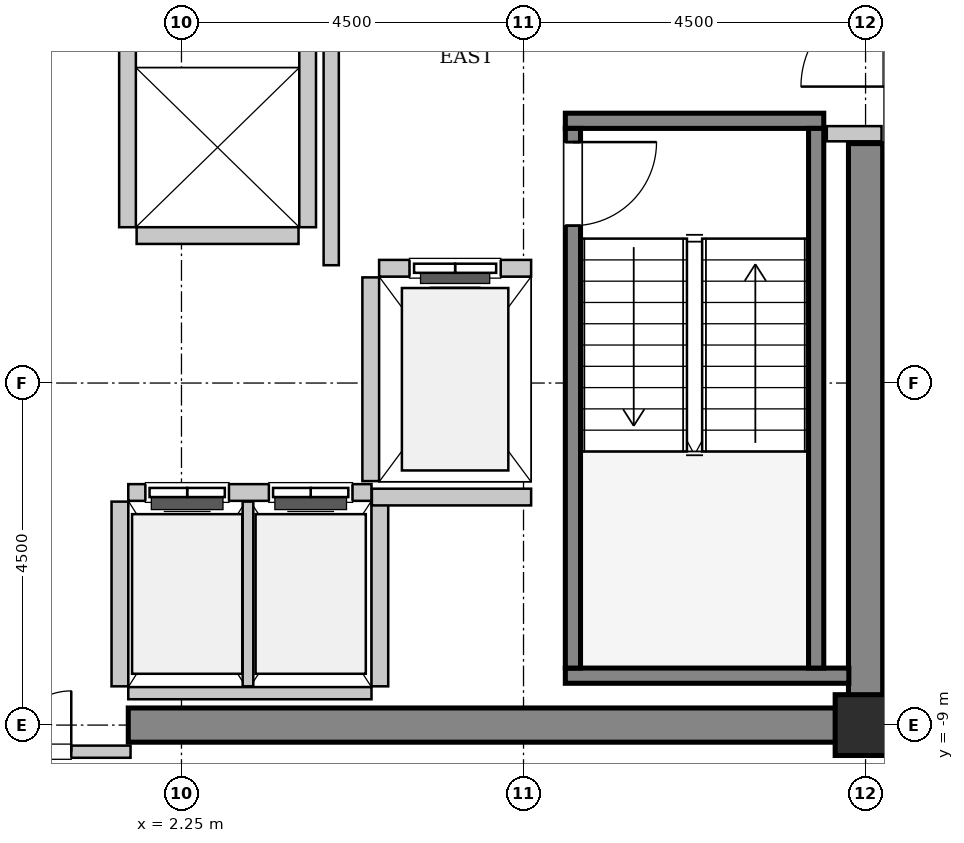
"""IFC4 building model, lengths in metres.
Left out: names, types, materials, properties, quantities, classifications, styles, units other than length and angle.
Written with IfcOpenShell. Run it as: python <this file> out.ifc"""

import sys

from ifc_helpers import new_model, si_unit, direction, frame, frame_2d, origin, origin_2d, place, context, subcontext, project, spatial, rectangle, hollow_rectangle, extrude, source, transform, mapped, element, fill, save


model = new_model("IFC4")
c1 = context("Model", 3, precision=1e-05, world=origin(), true_north=direction((0.0, 1.0)))
c2 = subcontext(c1, "Body", "Model", "MODEL_VIEW")
j1 = project(units=[si_unit("LENGTHUNIT", "METRE"), si_unit("PLANEANGLEUNIT", "RADIAN")], contexts=[c1])
p1 = place(None, origin())
s1 = spatial("IfcSite", under=j1, at=p1, CompositionType="ELEMENT")
p2 = place(p1, origin())
s2 = spatial("IfcBuilding", under=s1, at=p2, CompositionType="ELEMENT")
p3 = place(p2, frame((0.0, 0.0, 218.0)))
s3 = spatial("IfcBuildingStorey", under=s2, at=p3, CompositionType="ELEMENT", Elevation=218.0)
m1 = source(origin(), c2, "Body", "SweptSolid", [
    extrude(rectangle(XDim=9.925, YDim=0.45, at=frame_2d((4.962, 0.0))), origin(), (0.0, 0.0, 1.0), 3.8),
])
p4 = place(p3, frame((1.55, -9.0, 0.0), z_axis=(0.0, 0.0, 1.0), x_axis=(1.0, 0.0, 0.0)))
e1 = element("IfcWall", 1, at=p4, inside=s3, PredefinedType="SHEAR", context=c2, shape_type="MappedRepresentation", body=[
    mapped(m1, transform((0.0, 0.0, 0.0), x_axis=(1.0, 0.0, 0.0), y_axis=(0.0, 1.0, 0.0), z_axis=(0.0, 0.0, 1.0), scale=1.0)),
])
m2 = source(origin(), c2, "Body", "SweptSolid", [
    extrude(rectangle(XDim=7.425, YDim=0.45, at=frame_2d((3.712, 0.0))), origin(), (0.0, 0.0, 1.0), 3.8),
])
p5 = place(p3, frame((11.25, -8.775, 0.0), z_axis=(0.0, 0.0, 1.0), x_axis=(0.0, 1.0, 0.0)))
e2 = element("IfcWall", 2, at=p5, inside=s3, PredefinedType="SHEAR", context=c2, shape_type="MappedRepresentation", body=[
    mapped(m2, transform((0.0, 0.0, 0.0), x_axis=(1.0, 0.0, 0.0), y_axis=(0.0, 1.0, 0.0), z_axis=(0.0, 0.0, 1.0), scale=1.0)),
])
m3 = source(origin(), c2, "Body", "SweptSolid", [
    extrude(hollow_rectangle(XDim=0.8, YDim=0.8, WallThickness=0.04, InnerFilletRadius=0.04, OuterFilletRadius=0.08, at=origin_2d()), origin(), (0.0, 0.0, 1.0), 3.8),
])
p6 = place(p3, frame((11.25, -9.0, 0.0), z_axis=(0.0, 0.0, 1.0), x_axis=(1.0, 0.0, 0.0)))
e3 = element("IfcColumn", 3, at=p6, inside=s3, PredefinedType="COLUMN", context=c2, shape_type="MappedRepresentation", body=[
    mapped(m3, transform((0.0, 0.0, 0.0), x_axis=(1.0, 0.0, 0.0), y_axis=(0.0, 1.0, 0.0), z_axis=(0.0, 0.0, 1.0), scale=1.0)),
])
m4 = source(origin(), c2, "Body", "SweptSolid", [
    extrude(rectangle(XDim=3.4, YDim=0.2, at=frame_2d((1.7, 0.0))), origin(), (0.0, 0.0, 1.0), 3.8),
])
p7 = place(p3, frame((7.3, -1.05, 0.0), z_axis=(0.0, 0.0, 1.0), x_axis=(1.0, 0.0, 0.0)))
e4 = element("IfcWall", 4, at=p7, inside=s3, PredefinedType="SOLIDWALL", context=c2, shape_type="MappedRepresentation", body=[
    mapped(m4, transform((0.0, 0.0, 0.0), x_axis=(1.0, 0.0, 0.0), y_axis=(0.0, 1.0, 0.0), z_axis=(0.0, 0.0, 1.0), scale=1.0)),
])
m5 = source(origin(), c2, "Body", "SweptSolid", [
    extrude(rectangle(XDim=3.73, YDim=0.2, at=frame_2d((1.865, 0.0))), origin(), (0.0, 0.0, 1.0), 3.8),
])
p8 = place(p3, frame((7.3, -8.35, 0.0), z_axis=(0.0, 0.0, 1.0), x_axis=(1.0, 0.0, 0.0)))
e5 = element("IfcWall", 5, at=p8, inside=s3, PredefinedType="SOLIDWALL", context=c2, shape_type="MappedRepresentation", body=[
    mapped(m5, transform((0.0, 0.0, 0.0), x_axis=(1.0, 0.0, 0.0), y_axis=(0.0, 1.0, 0.0), z_axis=(0.0, 0.0, 1.0), scale=1.0)),
])
m6 = source(origin(), c2, "Body", "SweptSolid", [
    extrude(rectangle(XDim=7.1, YDim=0.2, at=frame_2d((3.55, 0.0))), origin(), (0.0, 0.0, 1.0), 3.8),
])
p9 = place(p3, frame((7.4, -1.15, 0.0), z_axis=(0.0, 0.0, 1.0), x_axis=(0.0, -1.0, 0.0)))
e6 = element("IfcWall", 6, at=p9, inside=s3, PredefinedType="SOLIDWALL", context=c2, shape_type="MappedRepresentation", body=[
    mapped(m6, transform((0.0, 0.0, 0.0), x_axis=(1.0, 0.0, 0.0), y_axis=(0.0, 1.0, 0.0), z_axis=(0.0, 0.0, 1.0), scale=1.0)),
])
p10 = place(p9, frame((0.18, 0.0, 0.0)))
e7 = element("IfcOpeningElement", 7, at=p10, cuts=e6, PredefinedType="OPENING", context=c2, shape_type="SweptSolid", body=[
    extrude(rectangle(XDim=1.1, YDim=2.15, at=frame_2d((0.55, 1.075))), frame((0.0, 0.11, 0.0), z_axis=(0.0, -1.0, 0.0), x_axis=(1.0, 0.0, 0.0)), (0.0, 0.0, 1.0), 0.22),
])
p11 = place(p3, frame((10.6, -1.15, 0.0), z_axis=(0.0, 0.0, 1.0), x_axis=(0.0, -1.0, 0.0)))
e8 = element("IfcWall", 8, at=p11, inside=s3, PredefinedType="SOLIDWALL", context=c2, shape_type="MappedRepresentation", body=[
    mapped(m6, transform((0.0, 0.0, 0.0), x_axis=(1.0, 0.0, 0.0), y_axis=(0.0, 1.0, 0.0), z_axis=(0.0, 0.0, 1.0), scale=1.0)),
])
m7 = source(origin(), c2, "Body", "SweptSolid", [
    extrude(rectangle(XDim=2.0, YDim=0.22, at=frame_2d((1.0, 0.0))), origin(), (0.0, 0.0, 1.0), 3.535),
])
p12 = place(p3, frame((6.85, -2.99, 0.0), z_axis=(0.0, 0.0, 1.0), x_axis=(-1.0, 0.0, 0.0)))
e9 = element("IfcWall", 9, at=p12, inside=s3, PredefinedType="SOLIDWALL", context=c2, shape_type="MappedRepresentation", body=[
    mapped(m7, transform((0.0, 0.0, 0.0), x_axis=(1.0, 0.0, 0.0), y_axis=(0.0, 1.0, 0.0), z_axis=(0.0, 0.0, 1.0), scale=1.0)),
])
p13 = place(p12, frame((0.4, 0.0, 0.0)))
e10 = element("IfcOpeningElement", 10, at=p13, cuts=e9, PredefinedType="OPENING", context=c2, shape_type="SweptSolid", body=[
    extrude(rectangle(XDim=1.2, YDim=2.2, at=frame_2d((0.6, 1.1))), frame((0.0, 0.12, 0.0), z_axis=(0.0, -1.0, 0.0), x_axis=(1.0, 0.0, 0.0)), (0.0, 0.0, 1.0), 0.24),
])
m8 = source(origin(), c2, "Body", "SweptSolid", [
    extrude(rectangle(XDim=2.68, YDim=0.22, at=frame_2d((1.34, 0.0))), origin(), (0.0, 0.0, 1.0), 3.535),
])
p14 = place(p3, frame((4.74, -3.11, 0.0), z_axis=(0.0, 0.0, 1.0), x_axis=(0.0, -1.0, 0.0)))
e11 = element("IfcWall", 11, at=p14, inside=s3, PredefinedType="SOLIDWALL", context=c2, shape_type="MappedRepresentation", body=[
    mapped(m8, transform((0.0, 0.0, 0.0), x_axis=(1.0, 0.0, 0.0), y_axis=(0.0, 1.0, 0.0), z_axis=(0.0, 0.0, 1.0), scale=1.0)),
])
m9 = source(origin(), c2, "Body", "SweptSolid", [
    extrude(rectangle(XDim=3.2, YDim=0.22, at=frame_2d((1.6, 0.0))), origin(), (0.0, 0.0, 1.0), 3.535),
])
p15 = place(p3, frame((4.75, -5.94, 0.0), z_axis=(0.0, 0.0, 1.0), x_axis=(-1.0, 0.0, 0.0)))
e12 = element("IfcWall", 12, at=p15, inside=s3, PredefinedType="SOLIDWALL", context=c2, shape_type="MappedRepresentation", body=[
    mapped(m9, transform((0.0, 0.0, 0.0), x_axis=(1.0, 0.0, 0.0), y_axis=(0.0, 1.0, 0.0), z_axis=(0.0, 0.0, 1.0), scale=1.0)),
])
p16 = place(p15, frame((1.875, 0.0, 0.0)))
e13 = element("IfcOpeningElement", 13, at=p16, cuts=e12, PredefinedType="OPENING", context=c2, shape_type="SweptSolid", body=[
    extrude(rectangle(XDim=1.1, YDim=2.2, at=frame_2d((0.55, 1.1))), frame((0.0, 0.12, 0.0), z_axis=(0.0, -1.0, 0.0), x_axis=(1.0, 0.0, 0.0)), (0.0, 0.0, 1.0), 0.24),
])
p17 = place(p15, frame((0.25, 0.0, 0.0)))
e14 = element("IfcOpeningElement", 14, at=p17, cuts=e12, PredefinedType="OPENING", context=c2, shape_type="SweptSolid", body=[
    extrude(rectangle(XDim=1.1, YDim=2.2, at=frame_2d((0.55, 1.1))), frame((0.0, 0.12, 0.0), z_axis=(0.0, -1.0, 0.0), x_axis=(1.0, 0.0, 0.0)), (0.0, 0.0, 1.0), 0.24),
])
m10 = source(origin(), c2, "Body", "SweptSolid", [
    extrude(rectangle(XDim=3.2, YDim=0.16, at=frame_2d((1.6, 0.0))), origin(), (0.0, 0.0, 1.0), 2.625),
])
p18 = place(p3, frame((1.55, -8.58, 0.0), z_axis=(0.0, 0.0, 1.0), x_axis=(1.0, 0.0, 0.0)))
e15 = element("IfcWall", 15, at=p18, inside=s3, PredefinedType="PARTITIONING", context=c2, shape_type="MappedRepresentation", body=[
    mapped(m10, transform((0.0, 0.0, 0.0), x_axis=(1.0, 0.0, 0.0), y_axis=(0.0, 1.0, 0.0), z_axis=(0.0, 0.0, 1.0), scale=1.0)),
])
m11 = source(origin(), c2, "Body", "SweptSolid", [
    extrude(rectangle(XDim=2.43, YDim=0.22, at=frame_2d((1.215, 0.0))), origin(), (0.0, 0.0, 1.0), 3.535),
])
p19 = place(p3, frame((1.44, -6.06, 0.0), z_axis=(0.0, 0.0, 1.0), x_axis=(0.0, -1.0, 0.0)))
e16 = element("IfcWall", 16, at=p19, inside=s3, PredefinedType="SOLIDWALL", context=c2, shape_type="MappedRepresentation", body=[
    mapped(m11, transform((0.0, 0.0, 0.0), x_axis=(1.0, 0.0, 0.0), y_axis=(0.0, 1.0, 0.0), z_axis=(0.0, 0.0, 1.0), scale=1.0)),
])
m12 = source(origin(), c2, "Body", "SweptSolid", [
    extrude(rectangle(XDim=2.43, YDim=0.14, at=frame_2d((1.215, 0.0))), origin(), (0.0, 0.0, 1.0), 3.535),
])
p20 = place(p3, frame((3.125, -8.49, 0.0), z_axis=(0.0, 0.0, 1.0), x_axis=(0.0, 1.0, 0.0)))
e17 = element("IfcWall", 17, at=p20, inside=s3, PredefinedType="PARTITIONING", context=c2, shape_type="MappedRepresentation", body=[
    mapped(m12, transform((0.0, 0.0, 0.0), x_axis=(1.0, 0.0, 0.0), y_axis=(0.0, 1.0, 0.0), z_axis=(0.0, 0.0, 1.0), scale=1.0)),
])
p21 = place(p3, frame((4.86, -8.49, 0.0), z_axis=(0.0, 0.0, 1.0), x_axis=(0.0, 1.0, 0.0)))
e18 = element("IfcWall", 18, at=p21, inside=s3, PredefinedType="SOLIDWALL", context=c2, shape_type="MappedRepresentation", body=[
    mapped(m11, transform((0.0, 0.0, 0.0), x_axis=(1.0, 0.0, 0.0), y_axis=(0.0, 1.0, 0.0), z_axis=(0.0, 0.0, 1.0), scale=1.0)),
])
m13 = source(origin(), c2, "Body", "SweptSolid", [
    extrude(rectangle(XDim=4.9, YDim=0.22, at=frame_2d((2.45, 0.0))), origin(), (0.0, 0.0, 1.0), 3.535),
])
for number, where, z_axis, x_axis in (
    (19, (1.54, 2.45, 0.0), (0.0, 0.0, 1.0), (0.0, -1.0, 0.0)),
    (20, (3.91, -2.45, 0.0), (0.0, 0.0, 1.0), (0.0, 1.0, 0.0)),
):
    element("IfcWall", number, at=place(p3, frame(where, z_axis=z_axis, x_axis=x_axis)), inside=s3, PredefinedType="SOLIDWALL", context=c2, shape_type="MappedRepresentation", body=[
        mapped(m13, transform((0.0, 0.0, 0.0), x_axis=(1.0, 0.0, 0.0), y_axis=(0.0, 1.0, 0.0), z_axis=(0.0, 0.0, 1.0), scale=1.0)),
    ])
m14 = source(origin(), c2, "Body", "SweptSolid", [
    extrude(rectangle(XDim=2.13, YDim=0.22, at=frame_2d((1.065, 0.0))), origin(), (0.0, 0.0, 1.0), 3.535),
])
p22 = place(p3, frame((1.66, -2.56, 0.0), z_axis=(0.0, 0.0, 1.0), x_axis=(1.0, 0.0, 0.0)))
e21 = element("IfcWall", 21, at=p22, inside=s3, PredefinedType="SOLIDWALL", context=c2, shape_type="MappedRepresentation", body=[
    mapped(m14, transform((0.0, 0.0, 0.0), x_axis=(1.0, 0.0, 0.0), y_axis=(0.0, 1.0, 0.0), z_axis=(0.0, 0.0, 1.0), scale=1.0)),
])
m15 = source(origin(), c2, "Body", "SweptSolid", [
    extrude(rectangle(XDim=2.095, YDim=0.22, at=frame_2d((1.048, 0.0))), origin(), (0.0, 0.0, 1.0), 3.535),
])
p23 = place(p3, frame((4.755, -6.0, 0.0), z_axis=(0.0, 0.0, 1.0), x_axis=(1.0, 0.0, 0.0)))
e22 = element("IfcWall", 22, at=p23, inside=s3, PredefinedType="SOLIDWALL", context=c2, shape_type="MappedRepresentation", body=[
    mapped(m15, transform((0.0, 0.0, 0.0), x_axis=(1.0, 0.0, 0.0), y_axis=(0.0, 1.0, 0.0), z_axis=(0.0, 0.0, 1.0), scale=1.0)),
])
m16 = source(origin(), c2, "Body", "SweptSolid", [
    extrude(rectangle(XDim=5.9, YDim=0.2, at=frame_2d((2.95, 0.0))), origin(), (0.0, 0.0, 1.0), 3.535),
])
p24 = place(p3, frame((4.22, -2.95, 0.0), z_axis=(0.0, 0.0, 1.0), x_axis=(0.0, 1.0, 0.0)))
e23 = element("IfcWall", 23, at=p24, inside=s3, PredefinedType="PARTITIONING", context=c2, shape_type="MappedRepresentation", body=[
    mapped(m16, transform((0.0, 0.0, 0.0), x_axis=(1.0, 0.0, 0.0), y_axis=(0.0, 1.0, 0.0), z_axis=(0.0, 0.0, 1.0), scale=1.0)),
])
m17 = source(origin(), c2, "Body", "SweptSolid", [
    extrude(rectangle(XDim=0.72, YDim=0.2, at=frame_2d((0.36, 0.0))), origin(), (0.0, 0.0, 1.0), 3.535),
])
p25 = place(p3, frame((10.74, -1.22, 0.0), z_axis=(0.0, 0.0, 1.0), x_axis=(1.0, 0.0, 0.0)))
e24 = element("IfcWall", 24, at=p25, inside=s3, PredefinedType="PARTITIONING", context=c2, shape_type="MappedRepresentation", body=[
    mapped(m17, transform((0.0, 0.0, 0.0), x_axis=(1.0, 0.0, 0.0), y_axis=(0.0, 1.0, 0.0), z_axis=(0.0, 0.0, 1.0), scale=1.0)),
])
m18 = source(origin(), c2, "Body", "SweptSolid", [
    extrude(rectangle(XDim=3.16, YDim=0.16, at=frame_2d((1.58, 0.0))), origin(), (0.0, 0.0, 1.0), 2.625),
])
p26 = place(p3, frame((-1.58, -9.35, 0.0), z_axis=(0.0, 0.0, 1.0), x_axis=(1.0, 0.0, 0.0)))
e25 = element("IfcWall", 25, at=p26, inside=s3, PredefinedType="PARTITIONING", context=c2, shape_type="MappedRepresentation", body=[
    mapped(m18, transform((0.0, 0.0, 0.0), x_axis=(1.0, 0.0, 0.0), y_axis=(0.0, 1.0, 0.0), z_axis=(0.0, 0.0, 1.0), scale=1.0)),
])
p27 = place(p26, frame((0.78, 0.0, 0.0)))
e26 = element("IfcOpeningElement", 26, at=p27, cuts=e25, PredefinedType="OPENING", context=c2, shape_type="SweptSolid", body=[
    extrude(rectangle(XDim=1.6, YDim=2.3, at=frame_2d((0.8, 1.15))), frame((0.0, 0.09, 0.0), z_axis=(0.0, -1.0, 0.0), x_axis=(1.0, 0.0, 0.0)), (0.0, 0.0, 1.0), 0.18),
])
m19 = source(origin(), c2, "Body", "SweptSolid", [
    extrude(rectangle(XDim=1.1, YDim=2.15, at=frame_2d((0.55, 1.075))), frame((0.0, 0.025, 0.0), z_axis=(0.0, -1.0, 0.0), x_axis=(1.0, 0.0, 0.0)), (0.0, 0.0, 1.0), 0.05),
])
p28 = place(p10, origin())
e27 = element("IfcDoor", 27, at=p28, inside=s3, OperationType="SINGLE_SWING_LEFT", PredefinedType="DOOR", context=c2, shape_type="MappedRepresentation", body=[
    mapped(m19, transform((0.0, 0.0, 0.0), x_axis=(1.0, 0.0, 0.0), y_axis=(0.0, 1.0, 0.0), z_axis=(0.0, 0.0, 1.0), scale=1.0)),
])
fill(e7, e27)
m20 = source(origin(), c2, "Body", "SweptSolid", [
    extrude(rectangle(XDim=1.2, YDim=2.2, at=frame_2d((0.6, 1.1))), frame((0.0, 0.025, 0.0), z_axis=(0.0, -1.0, 0.0), x_axis=(1.0, 0.0, 0.0)), (0.0, 0.0, 1.0), 0.05),
])
p29 = place(p13, origin())
e28 = element("IfcDoor", 28, at=p29, inside=s3, OperationType="SLIDING_TO_LEFT", PredefinedType="DOOR", context=c2, shape_type="MappedRepresentation", body=[
    mapped(m20, transform((0.0, 0.0, 0.0), x_axis=(1.0, 0.0, 0.0), y_axis=(0.0, 1.0, 0.0), z_axis=(0.0, 0.0, 1.0), scale=1.0)),
])
fill(e10, e28)
m21 = source(origin(), c2, "Body", "SweptSolid", [
    extrude(rectangle(XDim=1.1, YDim=2.2, at=frame_2d((0.55, 1.1))), frame((0.0, 0.025, 0.0), z_axis=(0.0, -1.0, 0.0), x_axis=(1.0, 0.0, 0.0)), (0.0, 0.0, 1.0), 0.05),
])
p30 = place(p16, origin())
e29 = element("IfcDoor", 29, at=p30, inside=s3, OperationType="DOUBLE_DOOR_SLIDING", PredefinedType="DOOR", context=c2, shape_type="MappedRepresentation", body=[
    mapped(m21, transform((0.0, 0.0, 0.0), x_axis=(1.0, 0.0, 0.0), y_axis=(0.0, 1.0, 0.0), z_axis=(0.0, 0.0, 1.0), scale=1.0)),
])
fill(e13, e29)
p31 = place(p17, origin())
e30 = element("IfcDoor", 30, at=p31, inside=s3, OperationType="DOUBLE_DOOR_SLIDING", PredefinedType="DOOR", context=c2, shape_type="MappedRepresentation", body=[
    mapped(m21, transform((0.0, 0.0, 0.0), x_axis=(1.0, 0.0, 0.0), y_axis=(0.0, 1.0, 0.0), z_axis=(0.0, 0.0, 1.0), scale=1.0)),
])
fill(e14, e30)
m22 = source(origin(), c2, "Body", "SweptSolid", [
    extrude(rectangle(XDim=1.6, YDim=2.3, at=frame_2d((0.8, 1.15))), frame((0.0, 0.025, 0.0), z_axis=(0.0, -1.0, 0.0), x_axis=(1.0, 0.0, 0.0)), (0.0, 0.0, 1.0), 0.05),
])
p32 = place(p27, origin())
e31 = element("IfcDoor", 31, at=p32, inside=s3, OperationType="DOUBLE_DOOR_SINGLE_SWING", PredefinedType="DOOR", context=c2, shape_type="MappedRepresentation", body=[
    mapped(m22, transform((0.0, 0.0, 0.0), x_axis=(1.0, 0.0, 0.0), y_axis=(0.0, 1.0, 0.0), z_axis=(0.0, 0.0, 1.0), scale=1.0)),
])
fill(e26, e31)
save(model, sys.argv[1])
